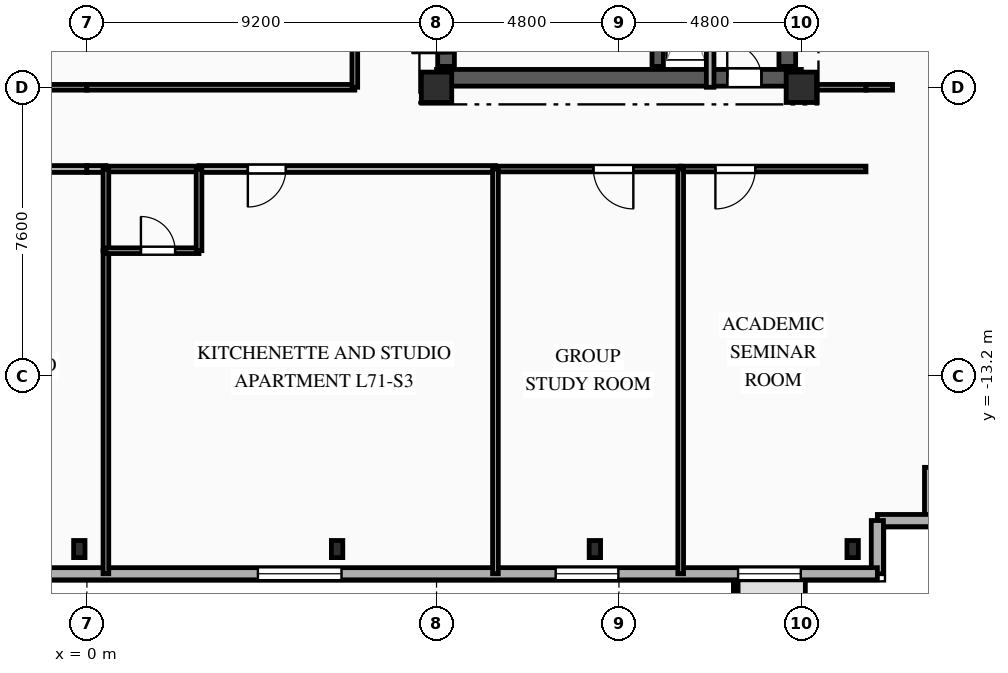
"""IFC4 building model, lengths in metres.
Left out: names, types, materials, properties, quantities, classifications, styles, units other than length and angle.
Written with IfcOpenShell. Run it as: python <this file> out.ifc"""

import sys

from ifc_helpers import new_model, si_unit, direction, frame, frame_2d, origin, origin_2d, place, context, subcontext, project, spatial, rectangle, i_section, extrude, element, fill, save


model = new_model("IFC4")
c1 = context("Model", 3, precision=1e-05, world=origin(), true_north=direction((0.0, 1.0)))
c2 = subcontext(c1, "Body", "Model", "MODEL_VIEW")
j1 = project(units=[si_unit("LENGTHUNIT", "METRE"), si_unit("PLANEANGLEUNIT", "RADIAN")], contexts=[c1])
p1 = place(None, origin())
s1 = spatial("IfcSite", under=j1, at=p1, CompositionType="ELEMENT")
p2 = place(p1, origin())
s2 = spatial("IfcBuilding", under=s1, at=p2, CompositionType="ELEMENT")
p3 = place(p2, frame((0.0, 0.0, 251.75)))
s3 = spatial("IfcBuildingStorey", under=s2, at=p3, CompositionType="ELEMENT", Elevation=251.75)
for number, where, z_axis, x_axis in (
    (1, (9.2, -5.6, 0.0), (0.0, 0.0, 1.0), (1.0, 0.0, 0.0)),
    (2, (18.8, -5.6, 0.0), (0.0, 0.0, 1.0), (1.0, 0.0, 0.0)),
):
    element("IfcColumn", number, at=place(p3, frame(where, z_axis=z_axis, x_axis=x_axis)), inside=s3, PredefinedType="COLUMN", context=c2, shape_type="SweptSolid", body=[
        extrude(rectangle(XDim=0.8, YDim=0.8, at=origin_2d()), origin(), (0.0, 0.0, 1.0), 3.35),
    ])
for number, where, z_axis, x_axis in (
    (3, (-0.2, -17.75, 0.0), (0.0, 0.0, 1.0), (1.0, 0.0, 0.0)),
    (4, (6.583, -17.75, 0.0), (0.0, 0.0, 1.0), (1.0, 0.0, 0.0)),
    (5, (13.367, -17.75, 0.0), (0.0, 0.0, 1.0), (1.0, 0.0, 0.0)),
    (6, (20.15, -17.75, 0.0), (0.0, 0.0, 1.0), (1.0, 0.0, 0.0)),
):
    element("IfcColumn", number, at=place(p3, frame(where, z_axis=z_axis, x_axis=x_axis)), inside=s3, PredefinedType="COLUMN", context=c2, shape_type="SweptSolid", body=[
        extrude(i_section(OverallWidth=0.3, OverallDepth=0.45, WebThickness=0.014, FlangeThickness=0.026, FilletRadius=0.027, at=origin_2d()), origin(), (0.0, 0.0, 1.0), 3.35),
    ])
for number, where, z_axis, x_axis in (
    (7, (22.2, -15.6, 0.0), (0.0, 0.0, 1.0), (0.0, -1.0, 0.0)),
    (8, (22.2, -17.0, 0.0), (0.0, 0.0, 1.0), (-1.0, 0.0, 0.0)),
    (9, (20.8, -17.0, 0.0), (0.0, 0.0, 1.0), (0.0, -1.0, 0.0)),
):
    element("IfcWall", number, at=place(p3, frame(where, z_axis=z_axis, x_axis=x_axis)), inside=s3, PredefinedType="SOLIDWALL", context=c2, shape_type="SweptSolid", body=[
        extrude(rectangle(XDim=1.4, YDim=0.32, at=frame_2d((0.7, 0.0))), origin(), (0.0, 0.0, 1.0), 3.04),
    ])
p4 = place(p3, frame((20.8, -18.4, 0.0), z_axis=(0.0, 0.0, 1.0), x_axis=(-1.0, 0.0, 0.0)))
e10 = element("IfcWall", 10, at=p4, inside=s3, PredefinedType="SOLIDWALL", context=c2, shape_type="SweptSolid", body=[
    extrude(rectangle(XDim=42.0, YDim=0.32, at=frame_2d((21.0, 0.0))), origin(), (0.0, 0.0, 1.0), 3.04),
])
p5 = place(p4, frame((2.015, 0.0, 0.85)))
e11 = element("IfcOpeningElement", 11, at=p5, cuts=e10, PredefinedType="OPENING", context=c2, shape_type="SweptSolid", body=[
    extrude(rectangle(XDim=1.65, YDim=1.85, at=frame_2d((0.825, 0.925))), frame((0.0, 0.17, 0.0), z_axis=(0.0, -1.0, 0.0), x_axis=(1.0, 0.0, 0.0)), (0.0, 0.0, 1.0), 0.34),
])
p6 = place(p4, frame((6.815, 0.0, 0.85)))
e12 = element("IfcOpeningElement", 12, at=p6, cuts=e10, PredefinedType="OPENING", context=c2, shape_type="SweptSolid", body=[
    extrude(rectangle(XDim=1.65, YDim=1.85, at=frame_2d((0.825, 0.925))), frame((0.0, 0.17, 0.0), z_axis=(0.0, -1.0, 0.0), x_axis=(1.0, 0.0, 0.0)), (0.0, 0.0, 1.0), 0.34),
])
p7 = place(p4, frame((14.1, 0.0, 0.85)))
e13 = element("IfcOpeningElement", 13, at=p7, cuts=e10, PredefinedType="OPENING", context=c2, shape_type="SweptSolid", body=[
    extrude(rectangle(XDim=2.2, YDim=1.85, at=frame_2d((1.1, 0.925))), frame((0.0, 0.17, 0.0), z_axis=(0.0, -1.0, 0.0), x_axis=(1.0, 0.0, 0.0)), (0.0, 0.0, 1.0), 0.34),
])
p8 = place(p4, frame((24.34, 0.0, 0.85)))
e14 = element("IfcOpeningElement", 14, at=p8, cuts=e10, PredefinedType="OPENING", context=c2, shape_type="SweptSolid", body=[
    extrude(rectangle(XDim=2.2, YDim=1.85, at=frame_2d((1.1, 0.925))), frame((0.0, 0.17, 0.0), z_axis=(0.0, -1.0, 0.0), x_axis=(1.0, 0.0, 0.0)), (0.0, 0.0, 1.0), 0.34),
])
p9 = place(p4, frame((32.455, 0.0, 0.85)))
e15 = element("IfcOpeningElement", 15, at=p9, cuts=e10, PredefinedType="OPENING", context=c2, shape_type="SweptSolid", body=[
    extrude(rectangle(XDim=1.65, YDim=1.85, at=frame_2d((0.825, 0.925))), frame((0.0, 0.17, 0.0), z_axis=(0.0, -1.0, 0.0), x_axis=(1.0, 0.0, 0.0)), (0.0, 0.0, 1.0), 0.34),
])
p10 = place(p4, frame((37.855, 0.0, 0.85)))
e16 = element("IfcOpeningElement", 16, at=p10, cuts=e10, PredefinedType="OPENING", context=c2, shape_type="SweptSolid", body=[
    extrude(rectangle(XDim=1.65, YDim=1.85, at=frame_2d((0.825, 0.925))), frame((0.0, 0.17, 0.0), z_axis=(0.0, -1.0, 0.0), x_axis=(1.0, 0.0, 0.0)), (0.0, 0.0, 1.0), 0.34),
])
p11 = place(p3, frame((9.2, -5.35, 0.0), z_axis=(0.0, 0.0, 1.0), x_axis=(1.0, 0.0, 0.0)))
e17 = element("IfcWall", 17, at=p11, inside=s3, PredefinedType="SHEAR", context=c2, shape_type="SweptSolid", body=[
    extrude(rectangle(XDim=9.6, YDim=0.44, at=frame_2d((4.8, 0.0))), origin(), (0.0, 0.0, 1.0), 3.04),
])
p12 = place(p11, frame((7.65, 0.0, 0.0)))
e18 = element("IfcOpeningElement", 18, at=p12, cuts=e17, PredefinedType="OPENING", context=c2, shape_type="SweptSolid", body=[
    extrude(rectangle(XDim=0.9, YDim=2.1, at=frame_2d((0.45, 1.05))), frame((0.0, 0.23, 0.0), z_axis=(0.0, -1.0, 0.0), x_axis=(1.0, 0.0, 0.0)), (0.0, 0.0, 1.0), 0.46),
])
p13 = place(p3, frame((9.45, -5.05, 0.0), z_axis=(0.0, 0.0, 1.0), x_axis=(0.0, 1.0, 0.0)))
e19 = element("IfcWall", 19, at=p13, inside=s3, PredefinedType="SHEAR", context=c2, shape_type="SweptSolid", body=[
    extrude(rectangle(XDim=10.1, YDim=0.44, at=frame_2d((5.05, 0.0))), origin(), (0.0, 0.0, 1.0), 3.04),
])
p14 = place(p13, frame((7.15, 0.0, 0.0)))
e20 = element("IfcOpeningElement", 20, at=p14, cuts=e19, PredefinedType="OPENING", context=c2, shape_type="SweptSolid", body=[
    extrude(rectangle(XDim=0.9, YDim=2.1, at=frame_2d((0.45, 1.05))), frame((0.0, 0.23, 0.0), z_axis=(0.0, -1.0, 0.0), x_axis=(1.0, 0.0, 0.0)), (0.0, 0.0, 1.0), 0.46),
])
p15 = place(p13, frame((2.4, 0.0, 0.0)))
e21 = element("IfcOpeningElement", 21, at=p15, cuts=e19, PredefinedType="OPENING", context=c2, shape_type="SweptSolid", body=[
    extrude(rectangle(XDim=1.2, YDim=2.15, at=frame_2d((0.6, 1.075))), frame((0.0, 0.23, 0.0), z_axis=(0.0, -1.0, 0.0), x_axis=(1.0, 0.0, 0.0)), (0.0, 0.0, 1.0), 0.46),
])
p16 = place(p13, frame((0.35, 0.0, 0.0)))
e22 = element("IfcOpeningElement", 22, at=p16, cuts=e19, PredefinedType="OPENING", context=c2, shape_type="SweptSolid", body=[
    extrude(rectangle(XDim=0.9, YDim=2.1, at=frame_2d((0.45, 1.05))), frame((0.0, 0.23, 0.0), z_axis=(0.0, -1.0, 0.0), x_axis=(1.0, 0.0, 0.0)), (0.0, 0.0, 1.0), 0.46),
])
p17 = place(p3, frame((18.43, -5.05, 0.0), z_axis=(0.0, 0.0, 1.0), x_axis=(0.0, 1.0, 0.0)))
e23 = element("IfcWall", 23, at=p17, inside=s3, PredefinedType="SHEAR", context=c2, shape_type="SweptSolid", body=[
    extrude(rectangle(XDim=10.1, YDim=0.44, at=frame_2d((5.05, 0.0))), origin(), (0.0, 0.0, 1.0), 3.04),
])
p18 = place(p3, frame((15.02, -5.05, 0.0), z_axis=(0.0, 0.0, 1.0), x_axis=(0.0, 1.0, 0.0)))
e24 = element("IfcWall", 24, at=p18, inside=s3, PredefinedType="SHEAR", context=c2, shape_type="SweptSolid", body=[
    extrude(rectangle(XDim=10.1, YDim=0.3, at=frame_2d((5.05, 0.0))), origin(), (0.0, 0.0, 1.0), 3.04),
])
p19 = place(p3, frame((16.4, -2.11, 0.0), z_axis=(0.0, 0.0, 1.0), x_axis=(0.0, -1.0, 0.0)))
e25 = element("IfcWall", 25, at=p19, inside=s3, PredefinedType="PARTITIONING", context=c2, shape_type="SweptSolid", body=[
    extrude(rectangle(XDim=3.49, YDim=0.2, at=frame_2d((1.745, 0.0))), origin(), (0.0, 0.0, 1.0), 3.04),
])
p20 = place(p3, frame((0.0, -7.75, 0.0), z_axis=(0.0, 0.0, 1.0), x_axis=(-1.0, 0.0, 0.0)))
e26 = element("IfcWall", 26, at=p20, inside=s3, PredefinedType="PARTITIONING", context=c2, shape_type="SweptSolid", body=[
    extrude(rectangle(XDim=7.3, YDim=0.18, at=frame_2d((3.65, 0.0))), origin(), (0.0, 0.0, 1.0), 3.04),
])
p21 = place(p20, frame((1.222, 0.0, 0.0)))
e27 = element("IfcOpeningElement", 27, at=p21, cuts=e26, PredefinedType="OPENING", context=c2, shape_type="SweptSolid", body=[
    extrude(rectangle(XDim=1.0, YDim=2.15, at=frame_2d((0.5, 1.075))), frame((0.0, 0.1, 0.0), z_axis=(0.0, -1.0, 0.0), x_axis=(1.0, 0.0, 0.0)), (0.0, 0.0, 1.0), 0.2),
])
p22 = place(p3, frame((-7.05, -5.6, 0.0), z_axis=(0.0, 0.0, 1.0), x_axis=(1.0, 0.0, 0.0)))
e28 = element("IfcWall", 28, at=p22, inside=s3, PredefinedType="PARTITIONING", context=c2, shape_type="SweptSolid", body=[
    extrude(rectangle(XDim=7.05, YDim=0.15, at=frame_2d((3.525, 0.0))), origin(), (0.0, 0.0, 1.0), 2.525),
])
p23 = place(p22, frame((4.815, 0.0, 0.0)))
e29 = element("IfcOpeningElement", 29, at=p23, cuts=e28, PredefinedType="OPENING", context=c2, shape_type="SweptSolid", body=[
    extrude(rectangle(XDim=1.05, YDim=2.15, at=frame_2d((0.525, 1.075))), frame((0.0, 0.085, 0.0), z_axis=(0.0, -1.0, 0.0), x_axis=(1.0, 0.0, 0.0)), (0.0, 0.0, 1.0), 0.17),
])
p24 = place(p3, frame((18.8, -5.6, 0.0), z_axis=(0.0, 0.0, 1.0), x_axis=(1.0, 0.0, 0.0)))
e30 = element("IfcWall", 30, at=p24, inside=s3, PredefinedType="PARTITIONING", context=c2, shape_type="SweptSolid", body=[
    extrude(rectangle(XDim=1.7, YDim=0.15, at=frame_2d((0.85, 0.0))), origin(), (0.0, 0.0, 1.0), 3.04),
])
p25 = place(p3, frame((20.5, -5.6, 0.0), z_axis=(0.0, 0.0, 1.0), x_axis=(1.0, 0.0, 0.0)))
e31 = element("IfcWall", 31, at=p25, inside=s3, PredefinedType="PARTITIONING", context=c2, shape_type="SweptSolid", body=[
    extrude(rectangle(XDim=0.7, YDim=0.15, at=frame_2d((0.35, 0.0))), origin(), (0.0, 0.0, 1.0), 3.04),
])
p26 = place(p3, frame((0.5, -7.75, 0.0), z_axis=(0.0, 0.0, 1.0), x_axis=(-1.0, 0.0, 0.0)))
e32 = element("IfcWall", 32, at=p26, inside=s3, PredefinedType="PARTITIONING", context=c2, shape_type="SweptSolid", body=[
    extrude(rectangle(XDim=0.5, YDim=0.18, at=frame_2d((0.25, 0.0))), origin(), (0.0, 0.0, 1.0), 3.04),
])
p27 = place(p3, frame((10.75, -7.75, 0.0), z_axis=(0.0, 0.0, 1.0), x_axis=(-1.0, 0.0, 0.0)))
e33 = element("IfcWall", 33, at=p27, inside=s3, PredefinedType="PARTITIONING", context=c2, shape_type="SweptSolid", body=[
    extrude(rectangle(XDim=7.8, YDim=0.18, at=frame_2d((3.9, 0.0))), origin(), (0.0, 0.0, 1.0), 3.04),
])
p28 = place(p27, frame((5.515, 0.0, 0.0)))
e34 = element("IfcOpeningElement", 34, at=p28, cuts=e33, PredefinedType="OPENING", context=c2, shape_type="SweptSolid", body=[
    extrude(rectangle(XDim=1.0, YDim=2.15, at=frame_2d((0.5, 1.075))), frame((0.0, 0.1, 0.0), z_axis=(0.0, -1.0, 0.0), x_axis=(1.0, 0.0, 0.0)), (0.0, 0.0, 1.0), 0.2),
])
p29 = place(p3, frame((2.95, -7.75, 0.0), z_axis=(0.0, 0.0, 1.0), x_axis=(-1.0, 0.0, 0.0)))
e35 = element("IfcWall", 35, at=p29, inside=s3, PredefinedType="PLUMBINGWALL", context=c2, shape_type="SweptSolid", body=[
    extrude(rectangle(XDim=2.45, YDim=0.15, at=frame_2d((1.225, 0.0))), origin(), (0.0, 0.0, 1.0), 3.04),
])
p30 = place(p3, frame((15.625, -7.75, 0.0), z_axis=(0.0, 0.0, 1.0), x_axis=(-1.0, 0.0, 0.0)))
e36 = element("IfcWall", 36, at=p30, inside=s3, PredefinedType="PARTITIONING", context=c2, shape_type="SweptSolid", body=[
    extrude(rectangle(XDim=4.875, YDim=0.15, at=frame_2d((2.438, 0.0))), origin(), (0.0, 0.0, 1.0), 3.04),
])
p31 = place(p30, frame((1.246, 0.0, 0.0)))
e37 = element("IfcOpeningElement", 37, at=p31, cuts=e36, PredefinedType="OPENING", context=c2, shape_type="SweptSolid", body=[
    extrude(rectangle(XDim=1.05, YDim=2.15, at=frame_2d((0.525, 1.075))), frame((0.0, 0.085, 0.0), z_axis=(0.0, -1.0, 0.0), x_axis=(1.0, 0.0, 0.0)), (0.0, 0.0, 1.0), 0.17),
])
p32 = place(p3, frame((20.5, -7.75, 0.0), z_axis=(0.0, 0.0, 1.0), x_axis=(-1.0, 0.0, 0.0)))
e38 = element("IfcWall", 38, at=p32, inside=s3, PredefinedType="PARTITIONING", context=c2, shape_type="SweptSolid", body=[
    extrude(rectangle(XDim=4.875, YDim=0.15, at=frame_2d((2.438, 0.0))), origin(), (0.0, 0.0, 1.0), 3.04),
])
p33 = place(p32, frame((2.912, 0.0, 0.0)))
e39 = element("IfcOpeningElement", 39, at=p33, cuts=e38, PredefinedType="OPENING", context=c2, shape_type="SweptSolid", body=[
    extrude(rectangle(XDim=1.05, YDim=2.15, at=frame_2d((0.525, 1.075))), frame((0.0, 0.085, 0.0), z_axis=(0.0, -1.0, 0.0), x_axis=(1.0, 0.0, 0.0)), (0.0, 0.0, 1.0), 0.17),
])
p34 = place(p3, frame((0.0, -5.6, 0.0), z_axis=(0.0, 0.0, 1.0), x_axis=(1.0, 0.0, 0.0)))
e40 = element("IfcWall", 40, at=p34, inside=s3, PredefinedType="PARTITIONING", context=c2, shape_type="SweptSolid", body=[
    extrude(rectangle(XDim=7.05, YDim=0.15, at=frame_2d((3.525, 0.0))), origin(), (0.0, 0.0, 1.0), 2.525),
])
p35 = place(p3, frame((7.05, -5.6, 0.0), z_axis=(0.0, 0.0, 1.0), x_axis=(0.0, 1.0, 0.0)))
e41 = element("IfcWall", 41, at=p35, inside=s3, PredefinedType="PARTITIONING", context=c2, shape_type="SweptSolid", body=[
    extrude(rectangle(XDim=7.05, YDim=0.15, at=frame_2d((3.525, 0.0))), origin(), (0.0, 0.0, 1.0), 3.04),
])
p36 = place(p3, frame((0.5, -9.9, 0.0), z_axis=(0.0, 0.0, 1.0), x_axis=(0.0, -1.0, 0.0)))
e42 = element("IfcWall", 42, at=p36, inside=s3, PredefinedType="PARTITIONING", context=c2, shape_type="SweptSolid", body=[
    extrude(rectangle(XDim=8.5, YDim=0.15, at=frame_2d((4.25, 0.0))), origin(), (0.0, 0.0, 1.0), 3.04),
])
p37 = place(p3, frame((0.5, -7.75, 0.0), z_axis=(0.0, 0.0, 1.0), x_axis=(0.0, -1.0, 0.0)))
e43 = element("IfcWall", 43, at=p37, inside=s3, PredefinedType="PLUMBINGWALL", context=c2, shape_type="SweptSolid", body=[
    extrude(rectangle(XDim=2.15, YDim=0.15, at=frame_2d((1.075, 0.0))), origin(), (0.0, 0.0, 1.0), 3.04),
])
p38 = place(p3, frame((0.5, -9.9, 0.0), z_axis=(0.0, 0.0, 1.0), x_axis=(1.0, 0.0, 0.0)))
e44 = element("IfcWall", 44, at=p38, inside=s3, PredefinedType="PLUMBINGWALL", context=c2, shape_type="SweptSolid", body=[
    extrude(rectangle(XDim=2.45, YDim=0.15, at=frame_2d((1.225, 0.0))), origin(), (0.0, 0.0, 1.0), 3.04),
])
p39 = place(p38, frame((0.921, 0.0, 0.0)))
e45 = element("IfcOpeningElement", 45, at=p39, cuts=e44, PredefinedType="OPENING", context=c2, shape_type="SweptSolid", body=[
    extrude(rectangle(XDim=0.9, YDim=2.1, at=frame_2d((0.45, 1.05))), frame((0.0, 0.085, 0.0), z_axis=(0.0, -1.0, 0.0), x_axis=(1.0, 0.0, 0.0)), (0.0, 0.0, 1.0), 0.17),
])
p40 = place(p3, frame((2.95, -9.9, 0.0), z_axis=(0.0, 0.0, 1.0), x_axis=(0.0, 1.0, 0.0)))
e46 = element("IfcWall", 46, at=p40, inside=s3, PredefinedType="PLUMBINGWALL", context=c2, shape_type="SweptSolid", body=[
    extrude(rectangle(XDim=2.15, YDim=0.15, at=frame_2d((1.075, 0.0))), origin(), (0.0, 0.0, 1.0), 3.04),
])
for number, where, z_axis, x_axis in (
    (47, (10.75, -7.75, 0.0), (0.0, 0.0, 1.0), (0.0, -1.0, 0.0)),
    (48, (15.625, -7.75, 0.0), (0.0, 0.0, 1.0), (0.0, -1.0, 0.0)),
):
    element("IfcWall", number, at=place(p3, frame(where, z_axis=z_axis, x_axis=x_axis)), inside=s3, PredefinedType="PARTITIONING", context=c2, shape_type="SweptSolid", body=[
        extrude(rectangle(XDim=10.65, YDim=0.15, at=frame_2d((5.325, 0.0))), origin(), (0.0, 0.0, 1.0), 3.04),
    ])
p41 = place(p5, origin())
e49 = element("IfcWindow", 49, at=p41, inside=s3, PartitioningType="SINGLE_PANEL", PredefinedType="WINDOW", context=c2, shape_type="SweptSolid", body=[
    extrude(rectangle(XDim=1.65, YDim=1.85, at=frame_2d((0.825, 0.925))), frame((0.0, 0.03, 0.0), z_axis=(0.0, -1.0, 0.0), x_axis=(1.0, 0.0, 0.0)), (0.0, 0.0, 1.0), 0.06),
])
fill(e11, e49)
p42 = place(p6, origin())
e50 = element("IfcWindow", 50, at=p42, inside=s3, PartitioningType="SINGLE_PANEL", PredefinedType="WINDOW", context=c2, shape_type="SweptSolid", body=[
    extrude(rectangle(XDim=1.65, YDim=1.85, at=frame_2d((0.825, 0.925))), frame((0.0, 0.03, 0.0), z_axis=(0.0, -1.0, 0.0), x_axis=(1.0, 0.0, 0.0)), (0.0, 0.0, 1.0), 0.06),
])
fill(e12, e50)
p43 = place(p7, origin())
e51 = element("IfcWindow", 51, at=p43, inside=s3, PartitioningType="SINGLE_PANEL", PredefinedType="WINDOW", context=c2, shape_type="SweptSolid", body=[
    extrude(rectangle(XDim=2.2, YDim=1.85, at=frame_2d((1.1, 0.925))), frame((0.0, 0.03, 0.0), z_axis=(0.0, -1.0, 0.0), x_axis=(1.0, 0.0, 0.0)), (0.0, 0.0, 1.0), 0.06),
])
fill(e13, e51)
p44 = place(p12, origin())
e52 = element("IfcDoor", 52, at=p44, inside=s3, OperationType="SINGLE_SWING_LEFT", PredefinedType="DOOR", context=c2, shape_type="SweptSolid", body=[
    extrude(rectangle(XDim=0.9, YDim=2.1, at=frame_2d((0.45, 1.05))), frame((0.0, 0.025, 0.0), z_axis=(0.0, -1.0, 0.0), x_axis=(1.0, 0.0, 0.0)), (0.0, 0.0, 1.0), 0.05),
])
fill(e18, e52)
p45 = place(p16, origin())
e53 = element("IfcDoor", 53, at=p45, inside=s3, OperationType="SINGLE_SWING_LEFT", PredefinedType="DOOR", context=c2, shape_type="SweptSolid", body=[
    extrude(rectangle(XDim=0.9, YDim=2.1, at=frame_2d((0.45, 1.05))), frame((0.0, 0.025, 0.0), z_axis=(0.0, -1.0, 0.0), x_axis=(1.0, 0.0, 0.0)), (0.0, 0.0, 1.0), 0.05),
])
fill(e22, e53)
p46 = place(p28, origin())
e54 = element("IfcDoor", 54, at=p46, inside=s3, OperationType="SINGLE_SWING_RIGHT", PredefinedType="DOOR", context=c2, shape_type="SweptSolid", body=[
    extrude(rectangle(XDim=1.0, YDim=2.15, at=frame_2d((0.5, 1.075))), frame((0.0, 0.025, 0.0), z_axis=(0.0, -1.0, 0.0), x_axis=(1.0, 0.0, 0.0)), (0.0, 0.0, 1.0), 0.05),
])
fill(e34, e54)
p47 = place(p31, origin())
e55 = element("IfcDoor", 55, at=p47, inside=s3, OperationType="SINGLE_SWING_LEFT", PredefinedType="DOOR", context=c2, shape_type="SweptSolid", body=[
    extrude(rectangle(XDim=1.05, YDim=2.15, at=frame_2d((0.525, 1.075))), frame((0.0, 0.025, 0.0), z_axis=(0.0, -1.0, 0.0), x_axis=(1.0, 0.0, 0.0)), (0.0, 0.0, 1.0), 0.05),
])
fill(e37, e55)
p48 = place(p33, origin())
e56 = element("IfcDoor", 56, at=p48, inside=s3, OperationType="SINGLE_SWING_RIGHT", PredefinedType="DOOR", context=c2, shape_type="SweptSolid", body=[
    extrude(rectangle(XDim=1.05, YDim=2.15, at=frame_2d((0.525, 1.075))), frame((0.0, 0.025, 0.0), z_axis=(0.0, -1.0, 0.0), x_axis=(1.0, 0.0, 0.0)), (0.0, 0.0, 1.0), 0.05),
])
fill(e39, e56)
p49 = place(p39, origin())
e57 = element("IfcDoor", 57, at=p49, inside=s3, OperationType="SINGLE_SWING_LEFT", PredefinedType="DOOR", context=c2, shape_type="SweptSolid", body=[
    extrude(rectangle(XDim=0.9, YDim=2.1, at=frame_2d((0.45, 1.05))), frame((0.0, 0.025, 0.0), z_axis=(0.0, -1.0, 0.0), x_axis=(1.0, 0.0, 0.0)), (0.0, 0.0, 1.0), 0.05),
])
fill(e45, e57)
save(model, sys.argv[1])
